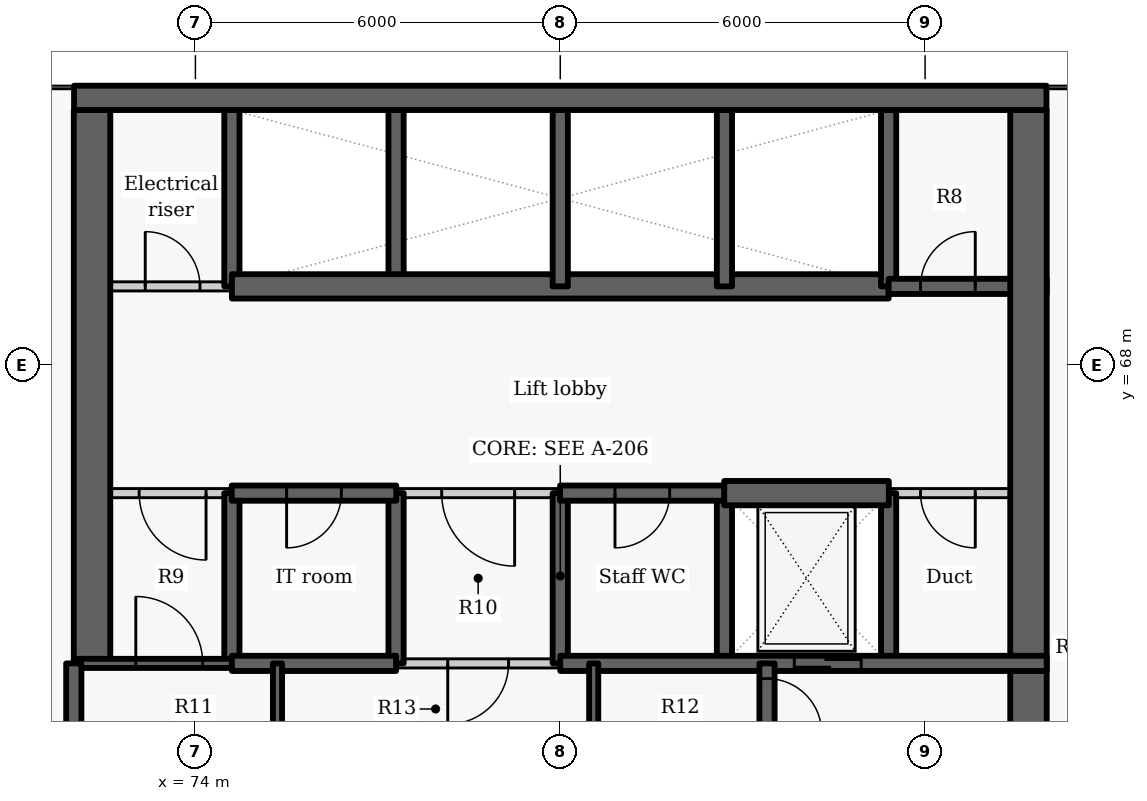
"""IFC4 building model, lengths in metres.
Left out: names, types, materials, properties, quantities, classifications, styles, units other than length and angle.
Written with IfcOpenShell. Run it as: python <this file> out.ifc"""

import sys

from ifc_helpers import new_model, si_unit, direction, frame, frame_2d, origin, place, context, subcontext, project, spatial, rectangle, extrude, element, fill, save


model = new_model("IFC4")
c1 = context("Model", 3, precision=1e-05, world=origin(), true_north=direction((0.0, 1.0)))
c2 = subcontext(c1, "Body", "Model", "MODEL_VIEW")
j1 = project(units=[si_unit("LENGTHUNIT", "METRE"), si_unit("PLANEANGLEUNIT", "RADIAN")], contexts=[c1])
p1 = place(None, origin())
s1 = spatial("IfcSite", under=j1, at=p1, CompositionType="ELEMENT")
p2 = place(p1, origin())
s2 = spatial("IfcBuilding", under=s1, at=p2, CompositionType="ELEMENT")
p3 = place(p2, frame((0.0, 0.0, 24.0)))
s3 = spatial("IfcBuildingStorey", under=s2, at=p3, CompositionType="ELEMENT", Elevation=24.0)
p4 = place(p3, frame((74.6, 63.1, -0.3), z_axis=(0.0, 0.0, 1.0), x_axis=(0.0, 1.0, 0.0)))
e1 = element("IfcWall", 1, at=p4, inside=s3, PredefinedType="SHEAR", context=c2, shape_type="SweptSolid", body=[
    extrude(rectangle(XDim=2.8, YDim=0.25, at=frame_2d((1.4, 0.0))), origin(), (0.0, 0.0, 1.0), 4.225),
])
p5 = place(p3, frame((74.6, 69.3, -0.3), z_axis=(0.0, 0.0, 1.0), x_axis=(0.0, 1.0, 0.0)))
e2 = element("IfcWall", 2, at=p5, inside=s3, PredefinedType="SHEAR", context=c2, shape_type="SweptSolid", body=[
    extrude(rectangle(XDim=2.9, YDim=0.25, at=frame_2d((1.45, 0.0))), origin(), (0.0, 0.0, 1.0), 4.225),
])
p6 = place(p3, frame((72.0, 69.3, 0.0), z_axis=(0.0, 0.0, 1.0), x_axis=(1.0, 0.0, 0.0)))
e3 = element("IfcWall", 3, at=p6, inside=s3, PredefinedType="PARTITIONING", context=c2, shape_type="SweptSolid", body=[
    extrude(rectangle(XDim=2.6, YDim=0.15, at=frame_2d((1.3, 0.0))), origin(), (0.0, 0.0, 1.0), 3.925),
])
p7 = place(p6, frame((1.175, 0.0, 0.0)))
e4 = element("IfcOpeningElement", 4, at=p7, cuts=e3, PredefinedType="OPENING", context=c2, shape_type="SweptSolid", body=[
    extrude(rectangle(XDim=0.9, YDim=2.1, at=frame_2d((0.45, 1.05))), frame((0.0, 0.085, 0.0), z_axis=(0.0, -1.0, 0.0), x_axis=(1.0, 0.0, 0.0)), (0.0, 0.0, 1.0), 0.17),
])
p8 = place(p3, frame((72.3, 63.1, -0.3), z_axis=(0.0, 0.0, 1.0), x_axis=(0.0, 1.0, 0.0)))
e5 = element("IfcWall", 5, at=p8, inside=s3, PredefinedType="SHEAR", context=c2, shape_type="SweptSolid", body=[
    extrude(rectangle(XDim=9.1, YDim=0.6, at=frame_2d((4.55, 0.0))), origin(), (0.0, 0.0, 1.0), 4.225),
])
p9 = place(p3, frame((77.3, 63.1, -0.3), z_axis=(0.0, 0.0, 1.0), x_axis=(0.0, 1.0, 0.0)))
e6 = element("IfcWall", 6, at=p9, inside=s3, PredefinedType="SHEAR", context=c2, shape_type="SweptSolid", body=[
    extrude(rectangle(XDim=2.8, YDim=0.25, at=frame_2d((1.4, 0.0))), origin(), (0.0, 0.0, 1.0), 4.225),
])
p10 = place(p3, frame((77.3, 69.3, -0.3), z_axis=(0.0, 0.0, 1.0), x_axis=(0.0, 1.0, 0.0)))
e7 = element("IfcWall", 7, at=p10, inside=s3, PredefinedType="SHEAR", context=c2, shape_type="SweptSolid", body=[
    extrude(rectangle(XDim=2.9, YDim=0.25, at=frame_2d((1.45, 0.0))), origin(), (0.0, 0.0, 1.0), 4.225),
])
p11 = place(p3, frame((74.6, 69.3, -0.3), z_axis=(0.0, 0.0, 1.0), x_axis=(1.0, 0.0, 0.0)))
e8 = element("IfcWall", 8, at=p11, inside=s3, PredefinedType="SHEAR", context=c2, shape_type="SweptSolid", body=[
    extrude(rectangle(XDim=10.8, YDim=0.4, at=frame_2d((5.4, 0.0))), origin(), (0.0, 0.0, 1.0), 4.225),
])
p12 = place(p3, frame((80.0, 63.1, -0.3), z_axis=(0.0, 0.0, 1.0), x_axis=(0.0, 1.0, 0.0)))
e9 = element("IfcWall", 9, at=p12, inside=s3, PredefinedType="SHEAR", context=c2, shape_type="SweptSolid", body=[
    extrude(rectangle(XDim=2.8, YDim=0.25, at=frame_2d((1.4, 0.0))), origin(), (0.0, 0.0, 1.0), 4.225),
])
p13 = place(p3, frame((80.0, 69.3, -0.3), z_axis=(0.0, 0.0, 1.0), x_axis=(0.0, 1.0, 0.0)))
e10 = element("IfcWall", 10, at=p13, inside=s3, PredefinedType="SHEAR", context=c2, shape_type="SweptSolid", body=[
    extrude(rectangle(XDim=2.9, YDim=0.25, at=frame_2d((1.45, 0.0))), origin(), (0.0, 0.0, 1.0), 4.225),
])
p14 = place(p3, frame((82.7, 63.1, -0.3), z_axis=(0.0, 0.0, 1.0), x_axis=(0.0, 1.0, 0.0)))
e11 = element("IfcWall", 11, at=p14, inside=s3, PredefinedType="SHEAR", context=c2, shape_type="SweptSolid", body=[
    extrude(rectangle(XDim=2.8, YDim=0.25, at=frame_2d((1.4, 0.0))), origin(), (0.0, 0.0, 1.0), 4.225),
])
p15 = place(p3, frame((82.7, 69.3, -0.3), z_axis=(0.0, 0.0, 1.0), x_axis=(0.0, 1.0, 0.0)))
e12 = element("IfcWall", 12, at=p15, inside=s3, PredefinedType="SHEAR", context=c2, shape_type="SweptSolid", body=[
    extrude(rectangle(XDim=2.9, YDim=0.25, at=frame_2d((1.45, 0.0))), origin(), (0.0, 0.0, 1.0), 4.225),
])
p16 = place(p3, frame((85.4, 63.1, -0.3), z_axis=(0.0, 0.0, 1.0), x_axis=(0.0, 1.0, 0.0)))
e13 = element("IfcWall", 13, at=p16, inside=s3, PredefinedType="SHEAR", context=c2, shape_type="SweptSolid", body=[
    extrude(rectangle(XDim=2.8, YDim=0.25, at=frame_2d((1.4, 0.0))), origin(), (0.0, 0.0, 1.0), 4.225),
])
p17 = place(p3, frame((85.4, 69.3, -0.3), z_axis=(0.0, 0.0, 1.0), x_axis=(0.0, 1.0, 0.0)))
e14 = element("IfcWall", 14, at=p17, inside=s3, PredefinedType="SHEAR", context=c2, shape_type="SweptSolid", body=[
    extrude(rectangle(XDim=2.9, YDim=0.25, at=frame_2d((1.45, 0.0))), origin(), (0.0, 0.0, 1.0), 4.225),
])
p18 = place(p3, frame((85.4, 69.3, -0.3), z_axis=(0.0, 0.0, 1.0), x_axis=(1.0, 0.0, 0.0)))
e15 = element("IfcWall", 15, at=p18, inside=s3, PredefinedType="SHEAR", context=c2, shape_type="SweptSolid", body=[
    extrude(rectangle(XDim=2.6, YDim=0.25, at=frame_2d((1.3, 0.0))), origin(), (0.0, 0.0, 1.0), 4.225),
])
p19 = place(p18, frame((0.525, 0.0, 0.3)))
e16 = element("IfcOpeningElement", 16, at=p19, cuts=e15, PredefinedType="OPENING", context=c2, shape_type="SweptSolid", body=[
    extrude(rectangle(XDim=0.9, YDim=2.1, at=frame_2d((0.45, 1.05))), frame((0.0, 0.135, 0.0), z_axis=(0.0, -1.0, 0.0), x_axis=(1.0, 0.0, 0.0)), (0.0, 0.0, 1.0), 0.27),
])
p20 = place(p3, frame((87.7, 72.2, -0.3), z_axis=(0.0, 0.0, 1.0), x_axis=(0.0, -1.0, 0.0)))
e17 = element("IfcWall", 17, at=p20, inside=s3, PredefinedType="SHEAR", context=c2, shape_type="SweptSolid", body=[
    extrude(rectangle(XDim=15.6, YDim=0.6, at=frame_2d((7.8, 0.0))), origin(), (0.0, 0.0, 1.0), 4.225),
])
p21 = place(p20, frame((11.8, 0.0, 0.3)))
e18 = element("IfcOpeningElement", 18, at=p21, cuts=e17, PredefinedType="OPENING", context=c2, shape_type="SweptSolid", body=[
    extrude(rectangle(XDim=1.1, YDim=2.1, at=frame_2d((0.55, 1.05))), frame((0.0, 0.31, 0.0), z_axis=(0.0, -1.0, 0.0), x_axis=(1.0, 0.0, 0.0)), (0.0, 0.0, 1.0), 0.62),
])
p22 = place(p3, frame((74.603, 65.9, 0.0), z_axis=(0.0, 0.0, 1.0), x_axis=(-1.0, 0.0, 0.0)))
e19 = element("IfcWall", 19, at=p22, inside=s3, PredefinedType="PARTITIONING", context=c2, shape_type="SweptSolid", body=[
    extrude(rectangle(XDim=2.603, YDim=0.15, at=frame_2d((1.302, 0.0))), origin(), (0.0, 0.0, 1.0), 3.925),
])
p23 = place(p22, frame((0.428, 0.0, 0.0)))
e20 = element("IfcOpeningElement", 20, at=p23, cuts=e19, PredefinedType="OPENING", context=c2, shape_type="SweptSolid", body=[
    extrude(rectangle(XDim=1.1, YDim=2.1, at=frame_2d((0.55, 1.05))), frame((0.0, 0.085, 0.0), z_axis=(0.0, -1.0, 0.0), x_axis=(1.0, 0.0, 0.0)), (0.0, 0.0, 1.0), 0.17),
])
p24 = place(p3, frame((80.003, 65.9, 0.0), z_axis=(0.0, 0.0, 1.0), x_axis=(-1.0, 0.0, 0.0)))
e21 = element("IfcWall", 21, at=p24, inside=s3, PredefinedType="PARTITIONING", context=c2, shape_type="SweptSolid", body=[
    extrude(rectangle(XDim=2.706, YDim=0.15, at=frame_2d((1.353, 0.0))), origin(), (0.0, 0.0, 1.0), 3.925),
])
p25 = place(p24, frame((0.753, 0.0, 0.0)))
e22 = element("IfcOpeningElement", 22, at=p25, cuts=e21, PredefinedType="OPENING", context=c2, shape_type="SweptSolid", body=[
    extrude(rectangle(XDim=1.2, YDim=2.1, at=frame_2d((0.6, 1.05))), frame((0.0, 0.085, 0.0), z_axis=(0.0, -1.0, 0.0), x_axis=(1.0, 0.0, 0.0)), (0.0, 0.0, 1.0), 0.17),
])
p26 = place(p3, frame((88.0, 65.9, 0.0), z_axis=(0.0, 0.0, 1.0), x_axis=(-1.0, 0.0, 0.0)))
e23 = element("IfcWall", 23, at=p26, inside=s3, PredefinedType="PARTITIONING", context=c2, shape_type="SweptSolid", body=[
    extrude(rectangle(XDim=2.603, YDim=0.15, at=frame_2d((1.302, 0.0))), origin(), (0.0, 0.0, 1.0), 3.925),
])
p27 = place(p26, frame((1.175, 0.0, 0.0)))
e24 = element("IfcOpeningElement", 24, at=p27, cuts=e23, PredefinedType="OPENING", context=c2, shape_type="SweptSolid", body=[
    extrude(rectangle(XDim=0.9, YDim=2.1, at=frame_2d((0.45, 1.05))), frame((0.0, 0.085, 0.0), z_axis=(0.0, -1.0, 0.0), x_axis=(1.0, 0.0, 0.0)), (0.0, 0.0, 1.0), 0.17),
])
p28 = place(p3, frame((77.303, 65.9, -0.3), z_axis=(0.0, 0.0, 1.0), x_axis=(-1.0, 0.0, 0.0)))
e25 = element("IfcWall", 25, at=p28, inside=s3, PredefinedType="SHEAR", context=c2, shape_type="SweptSolid", body=[
    extrude(rectangle(XDim=2.706, YDim=0.25, at=frame_2d((1.353, 0.0))), origin(), (0.0, 0.0, 1.0), 4.225),
])
p29 = place(p28, frame((0.903, 0.0, 0.3)))
e26 = element("IfcOpeningElement", 26, at=p29, cuts=e25, PredefinedType="OPENING", context=c2, shape_type="SweptSolid", body=[
    extrude(rectangle(XDim=0.9, YDim=2.1, at=frame_2d((0.45, 1.05))), frame((0.0, 0.135, 0.0), z_axis=(0.0, -1.0, 0.0), x_axis=(1.0, 0.0, 0.0)), (0.0, 0.0, 1.0), 0.27),
])
p30 = place(p3, frame((82.703, 65.9, -0.3), z_axis=(0.0, 0.0, 1.0), x_axis=(-1.0, 0.0, 0.0)))
e27 = element("IfcWall", 27, at=p30, inside=s3, PredefinedType="SHEAR", context=c2, shape_type="SweptSolid", body=[
    extrude(rectangle(XDim=2.706, YDim=0.25, at=frame_2d((1.353, 0.0))), origin(), (0.0, 0.0, 1.0), 4.225),
])
p31 = place(p30, frame((0.903, 0.0, 0.3)))
e28 = element("IfcOpeningElement", 28, at=p31, cuts=e27, PredefinedType="OPENING", context=c2, shape_type="SweptSolid", body=[
    extrude(rectangle(XDim=0.9, YDim=2.1, at=frame_2d((0.45, 1.05))), frame((0.0, 0.135, 0.0), z_axis=(0.0, -1.0, 0.0), x_axis=(1.0, 0.0, 0.0)), (0.0, 0.0, 1.0), 0.27),
])
p32 = place(p3, frame((82.697, 65.9, -0.3), z_axis=(0.0, 0.0, 1.0), x_axis=(1.0, 0.0, 0.0)))
e29 = element("IfcWall", 29, at=p32, inside=s3, PredefinedType="SHEAR", context=c2, shape_type="SweptSolid", body=[
    extrude(rectangle(XDim=2.706, YDim=0.4, at=frame_2d((1.353, 0.0))), origin(), (0.0, 0.0, 1.0), 4.225),
])
p33 = place(p3, frame((72.0, 63.1, -0.3), z_axis=(0.0, 0.0, 1.0), x_axis=(1.0, 0.0, 0.0)))
e30 = element("IfcWall", 30, at=p33, inside=s3, PredefinedType="SHEAR", context=c2, shape_type="SweptSolid", body=[
    extrude(rectangle(XDim=2.6, YDim=0.15, at=frame_2d((1.3, 0.0))), origin(), (0.0, 0.0, 1.0), 4.225),
])
p34 = place(p33, frame((1.02, 0.0, 0.3)))
e31 = element("IfcOpeningElement", 31, at=p34, cuts=e30, PredefinedType="OPENING", context=c2, shape_type="SweptSolid", body=[
    extrude(rectangle(XDim=1.1, YDim=2.1, at=frame_2d((0.55, 1.05))), frame((0.0, 0.085, 0.0), z_axis=(0.0, -1.0, 0.0), x_axis=(1.0, 0.0, 0.0)), (0.0, 0.0, 1.0), 0.17),
])
p35 = place(p3, frame((74.6, 63.1, -0.3), z_axis=(0.0, 0.0, 1.0), x_axis=(1.0, 0.0, 0.0)))
e32 = element("IfcWall", 32, at=p35, inside=s3, PredefinedType="SHEAR", context=c2, shape_type="SweptSolid", body=[
    extrude(rectangle(XDim=2.7, YDim=0.25, at=frame_2d((1.35, 0.0))), origin(), (0.0, 0.0, 1.0), 4.225),
])
p36 = place(p3, frame((80.0, 63.1, -0.3), z_axis=(0.0, 0.0, 1.0), x_axis=(1.0, 0.0, 0.0)))
e33 = element("IfcWall", 33, at=p36, inside=s3, PredefinedType="SHEAR", context=c2, shape_type="SweptSolid", body=[
    extrude(rectangle(XDim=8.0, YDim=0.25, at=frame_2d((4.0, 0.0))), origin(), (0.0, 0.0, 1.0), 4.225),
])
p37 = place(p36, frame((3.849, 0.0, 0.3)))
e34 = element("IfcOpeningElement", 34, at=p37, cuts=e33, PredefinedType="OPENING", context=c2, shape_type="SweptSolid", body=[
    extrude(rectangle(XDim=1.1, YDim=2.1, at=frame_2d((0.55, 1.05))), frame((0.0, 0.135, 0.0), z_axis=(0.0, -1.0, 0.0), x_axis=(1.0, 0.0, 0.0)), (0.0, 0.0, 1.0), 0.27),
])
p38 = place(p3, frame((80.0, 63.1, 0.0), z_axis=(0.0, 0.0, 1.0), x_axis=(-1.0, 0.0, 0.0)))
e35 = element("IfcWall", 35, at=p38, inside=s3, PredefinedType="PARTITIONING", context=c2, shape_type="SweptSolid", body=[
    extrude(rectangle(XDim=2.7, YDim=0.15, at=frame_2d((1.35, 0.0))), origin(), (0.0, 0.0, 1.0), 3.925),
])
p39 = place(p38, frame((0.85, 0.0, 0.0)))
e36 = element("IfcOpeningElement", 36, at=p39, cuts=e35, PredefinedType="OPENING", context=c2, shape_type="SweptSolid", body=[
    extrude(rectangle(XDim=1.0, YDim=2.1, at=frame_2d((0.5, 1.05))), frame((0.0, 0.085, 0.0), z_axis=(0.0, -1.0, 0.0), x_axis=(1.0, 0.0, 0.0)), (0.0, 0.0, 1.0), 0.17),
])
p40 = place(p3, frame((75.35, 61.597, -0.3), z_axis=(0.0, 0.0, 1.0), x_axis=(0.0, 1.0, 0.0)))
e37 = element("IfcWall", 37, at=p40, inside=s3, PredefinedType="SHEAR", context=c2, shape_type="SweptSolid", body=[
    extrude(rectangle(XDim=1.503, YDim=0.15, at=frame_2d((0.751, 0.0))), origin(), (0.0, 0.0, 1.0), 4.225),
])
p41 = place(p3, frame((72.0, 56.6, -0.3), z_axis=(0.0, 0.0, 1.0), x_axis=(0.0, 1.0, 0.0)))
e38 = element("IfcWall", 38, at=p41, inside=s3, PredefinedType="SHEAR", context=c2, shape_type="SweptSolid", body=[
    extrude(rectangle(XDim=6.5, YDim=0.25, at=frame_2d((3.25, 0.0))), origin(), (0.0, 0.0, 1.0), 4.225),
])
p42 = place(p3, frame((83.4, 63.1, -0.3), z_axis=(0.0, 0.0, 1.0), x_axis=(0.0, -1.0, 0.0)))
e39 = element("IfcWall", 39, at=p42, inside=s3, PredefinedType="SHEAR", context=c2, shape_type="SweptSolid", body=[
    extrude(rectangle(XDim=6.5, YDim=0.25, at=frame_2d((3.25, 0.0))), origin(), (0.0, 0.0, 1.0), 4.225),
])
p43 = place(p42, frame((0.25, 0.0, 0.3)))
e40 = element("IfcOpeningElement", 40, at=p43, cuts=e39, PredefinedType="OPENING", context=c2, shape_type="SweptSolid", body=[
    extrude(rectangle(XDim=0.9, YDim=2.1, at=frame_2d((0.45, 1.05))), frame((0.0, 0.135, 0.0), z_axis=(0.0, -1.0, 0.0), x_axis=(1.0, 0.0, 0.0)), (0.0, 0.0, 1.0), 0.27),
])
p44 = place(p3, frame((80.55, 61.597, -0.3), z_axis=(0.0, 0.0, 1.0), x_axis=(0.0, 1.0, 0.0)))
e41 = element("IfcWall", 41, at=p44, inside=s3, PredefinedType="SHEAR", context=c2, shape_type="SweptSolid", body=[
    extrude(rectangle(XDim=1.503, YDim=0.15, at=frame_2d((0.751, 0.0))), origin(), (0.0, 0.0, 1.0), 4.225),
])
p45 = place(p3, frame((72.004, 72.4, -0.3), z_axis=(0.0, 0.0, 1.0), x_axis=(1.0, 0.0, 0.0)))
e42 = element("IfcWall", 42, at=p45, inside=s3, PredefinedType="SHEAR", context=c2, shape_type="SweptSolid", body=[
    extrude(rectangle(XDim=15.992, YDim=0.4, at=frame_2d((7.996, 0.0))), origin(), (0.0, 0.0, 1.0), 4.225),
])
p46 = place(p7, origin())
e43 = element("IfcDoor", 43, at=p46, inside=s3, OperationType="SINGLE_SWING_LEFT", PredefinedType="DOOR", context=c2, shape_type="SweptSolid", body=[
    extrude(rectangle(XDim=0.9, YDim=2.1, at=frame_2d((0.45, 1.05))), frame((0.0, 0.025, 0.0), z_axis=(0.0, -1.0, 0.0), x_axis=(1.0, 0.0, 0.0)), (0.0, 0.0, 1.0), 0.05),
])
fill(e4, e43)
p47 = place(p19, origin())
e44 = element("IfcDoor", 44, at=p47, inside=s3, OperationType="SINGLE_SWING_RIGHT", PredefinedType="DOOR", context=c2, shape_type="SweptSolid", body=[
    extrude(rectangle(XDim=0.9, YDim=2.1, at=frame_2d((0.45, 1.05))), frame((0.0, 0.025, 0.0), z_axis=(0.0, -1.0, 0.0), x_axis=(1.0, 0.0, 0.0)), (0.0, 0.0, 1.0), 0.05),
])
fill(e16, e44)
p48 = place(p23, origin())
e45 = element("IfcDoor", 45, at=p48, inside=s3, OperationType="SINGLE_SWING_LEFT", PredefinedType="DOOR", context=c2, shape_type="SweptSolid", body=[
    extrude(rectangle(XDim=1.1, YDim=2.1, at=frame_2d((0.55, 1.05))), frame((0.0, 0.025, 0.0), z_axis=(0.0, -1.0, 0.0), x_axis=(1.0, 0.0, 0.0)), (0.0, 0.0, 1.0), 0.05),
])
fill(e20, e45)
p49 = place(p29, origin())
e46 = element("IfcDoor", 46, at=p49, inside=s3, OperationType="SINGLE_SWING_RIGHT", PredefinedType="DOOR", context=c2, shape_type="SweptSolid", body=[
    extrude(rectangle(XDim=0.9, YDim=2.1, at=frame_2d((0.45, 1.05))), frame((0.0, 0.025, 0.0), z_axis=(0.0, -1.0, 0.0), x_axis=(1.0, 0.0, 0.0)), (0.0, 0.0, 1.0), 0.05),
])
fill(e26, e46)
p50 = place(p25, origin())
e47 = element("IfcDoor", 47, at=p50, inside=s3, OperationType="DOUBLE_DOOR_SINGLE_SWING", PredefinedType="DOOR", context=c2, shape_type="SweptSolid", body=[
    extrude(rectangle(XDim=1.2, YDim=2.1, at=frame_2d((0.6, 1.05))), frame((0.0, 0.025, 0.0), z_axis=(0.0, -1.0, 0.0), x_axis=(1.0, 0.0, 0.0)), (0.0, 0.0, 1.0), 0.05),
])
fill(e22, e47)
p51 = place(p31, origin())
e48 = element("IfcDoor", 48, at=p51, inside=s3, OperationType="SINGLE_SWING_RIGHT", PredefinedType="DOOR", context=c2, shape_type="SweptSolid", body=[
    extrude(rectangle(XDim=0.9, YDim=2.1, at=frame_2d((0.45, 1.05))), frame((0.0, 0.025, 0.0), z_axis=(0.0, -1.0, 0.0), x_axis=(1.0, 0.0, 0.0)), (0.0, 0.0, 1.0), 0.05),
])
fill(e28, e48)
p52 = place(p37, origin())
e49 = element("IfcDoor", 49, at=p52, inside=s3, OperationType="SLIDING_TO_LEFT", PredefinedType="DOOR", context=c2, shape_type="SweptSolid", body=[
    extrude(rectangle(XDim=1.1, YDim=2.1, at=frame_2d((0.55, 1.05))), frame((0.0, 0.025, 0.0), z_axis=(0.0, -1.0, 0.0), x_axis=(1.0, 0.0, 0.0)), (0.0, 0.0, 1.0), 0.05),
])
fill(e34, e49)
p53 = place(p27, origin())
e50 = element("IfcDoor", 50, at=p53, inside=s3, OperationType="SINGLE_SWING_LEFT", PredefinedType="DOOR", context=c2, shape_type="SweptSolid", body=[
    extrude(rectangle(XDim=0.9, YDim=2.1, at=frame_2d((0.45, 1.05))), frame((0.0, 0.025, 0.0), z_axis=(0.0, -1.0, 0.0), x_axis=(1.0, 0.0, 0.0)), (0.0, 0.0, 1.0), 0.05),
])
fill(e24, e50)
p54 = place(p39, origin())
e51 = element("IfcDoor", 51, at=p54, inside=s3, OperationType="SINGLE_SWING_RIGHT", PredefinedType="DOOR", context=c2, shape_type="SweptSolid", body=[
    extrude(rectangle(XDim=1.0, YDim=2.1, at=frame_2d((0.5, 1.05))), frame((0.0, 0.025, 0.0), z_axis=(0.0, -1.0, 0.0), x_axis=(1.0, 0.0, 0.0)), (0.0, 0.0, 1.0), 0.05),
])
fill(e36, e51)
p55 = place(p34, origin())
e52 = element("IfcDoor", 52, at=p55, inside=s3, OperationType="SINGLE_SWING_LEFT", PredefinedType="DOOR", context=c2, shape_type="SweptSolid", body=[
    extrude(rectangle(XDim=1.1, YDim=2.1, at=frame_2d((0.55, 1.05))), frame((0.0, 0.025, 0.0), z_axis=(0.0, -1.0, 0.0), x_axis=(1.0, 0.0, 0.0)), (0.0, 0.0, 1.0), 0.05),
])
fill(e31, e52)
p56 = place(p43, origin())
e53 = element("IfcDoor", 53, at=p56, inside=s3, OperationType="SINGLE_SWING_RIGHT", PredefinedType="DOOR", context=c2, shape_type="SweptSolid", body=[
    extrude(rectangle(XDim=0.9, YDim=2.1, at=frame_2d((0.45, 1.05))), frame((0.0, 0.025, 0.0), z_axis=(0.0, -1.0, 0.0), x_axis=(1.0, 0.0, 0.0)), (0.0, 0.0, 1.0), 0.05),
])
fill(e40, e53)
save(model, sys.argv[1])
